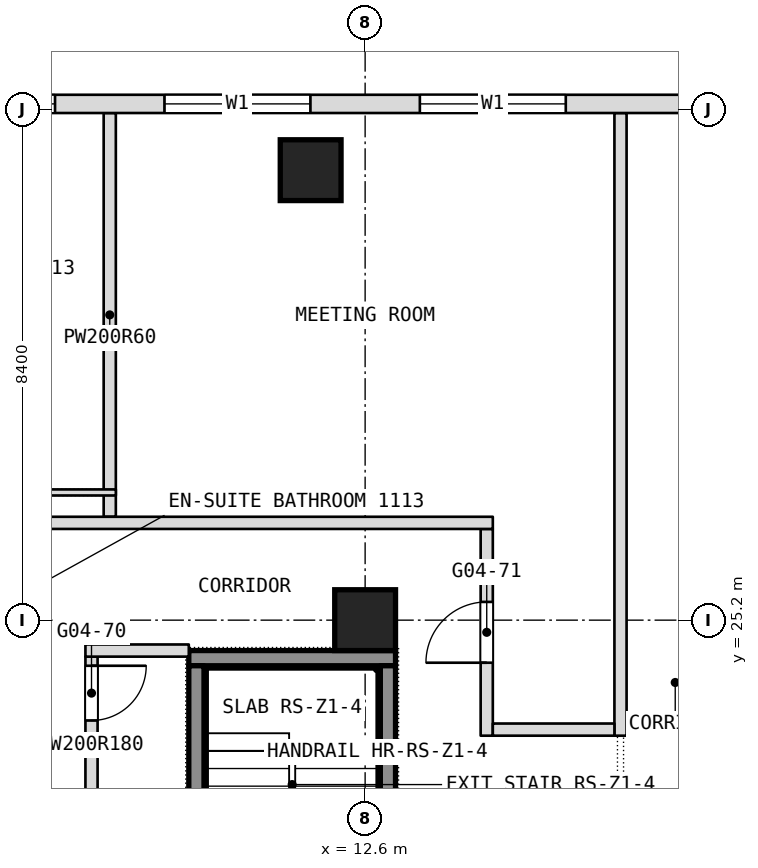
"""IFC4 building model, lengths in metres.
Left out: names, types, materials, properties, quantities, classifications, styles, units other than length and angle.
Written with IfcOpenShell. Run it as: python <this file> out.ifc"""

import sys

from ifc_helpers import new_model, si_unit, direction, frame, frame_2d, origin, origin_2d, place, context, subcontext, project, spatial, rectangle, extrude, element, fill, save


model = new_model("IFC4")
c1 = context("Model", 3, precision=1e-05, world=origin(), true_north=direction((0.0, 1.0)))
c2 = subcontext(c1, "Body", "Model", "MODEL_VIEW")
j1 = project(units=[si_unit("LENGTHUNIT", "METRE"), si_unit("PLANEANGLEUNIT", "RADIAN")], contexts=[c1])
p1 = place(None, origin())
s1 = spatial("IfcSite", under=j1, at=p1, CompositionType="ELEMENT")
p2 = place(p1, origin())
s2 = spatial("IfcBuilding", under=s1, at=p2, CompositionType="ELEMENT")
p3 = place(p2, frame((0.0, 0.0, 54.5)))
s3 = spatial("IfcBuildingStorey", under=s2, at=p3, CompositionType="ELEMENT", Elevation=54.5)
for number, where, z_axis, x_axis in (
    (1, (12.6, 25.2, 0.0), (0.0, 0.0, 1.0), (1.0, 0.0, 0.0)),
    (2, (11.704, 32.6, 0.0), (0.0, 0.0, 1.0), (1.0, 0.0, 0.0)),
):
    element("IfcColumn", number, at=place(p3, frame(where, z_axis=z_axis, x_axis=x_axis)), inside=s3, PredefinedType="COLUMN", context=c2, shape_type="SweptSolid", body=[
        extrude(rectangle(XDim=1.0, YDim=1.0, at=origin_2d()), origin(), (0.0, 0.0, 1.0), 3.6),
    ])
p4 = place(p3, frame((16.8, 23.3, 0.0), z_axis=(0.0, 0.0, 1.0), x_axis=(0.0, 1.0, 0.0)))
e3 = element("IfcWall", 3, at=p4, inside=s3, PredefinedType="PARTITIONING", context=c2, shape_type="SweptSolid", body=[
    extrude(rectangle(XDim=10.24, YDim=0.2, at=frame_2d((5.12, 0.0))), origin(), (0.0, 0.0, 1.0), 3.34),
])
p5 = place(p3, frame((14.6, 23.3, 0.0), z_axis=(0.0, 0.0, 1.0), x_axis=(0.0, 1.0, 0.0)))
e4 = element("IfcWall", 4, at=p5, inside=s3, PredefinedType="PARTITIONING", context=c2, shape_type="SweptSolid", body=[
    extrude(rectangle(XDim=3.4, YDim=0.2, at=frame_2d((1.7, 0.0))), origin(), (0.0, 0.0, 1.0), 3.34),
])
p6 = place(p5, frame((1.2, 0.0, 0.0)))
e5 = element("IfcOpeningElement", 5, at=p6, cuts=e4, PredefinedType="OPENING", context=c2, shape_type="SweptSolid", body=[
    extrude(rectangle(XDim=1.0, YDim=2.1, at=frame_2d((0.5, 1.05))), frame((0.0, 0.1, 0.0), z_axis=(0.0, -1.0, 0.0), x_axis=(1.0, 0.0, 0.0)), (0.0, 0.0, 1.0), 0.2),
])
p7 = place(p3, frame((8.4, 26.9, 0.0), z_axis=(0.0, 0.0, 1.0), x_axis=(0.0, 1.0, 0.0)))
e6 = element("IfcWall", 6, at=p7, inside=s3, PredefinedType="PARTITIONING", context=c2, shape_type="SweptSolid", body=[
    extrude(rectangle(XDim=6.64, YDim=0.2, at=frame_2d((3.32, 0.0))), origin(), (0.0, 0.0, 1.0), 3.34),
])
p8 = place(p3, frame((8.1, 21.7, 0.0), z_axis=(0.0, 0.0, 1.0), x_axis=(0.0, 1.0, 0.0)))
e7 = element("IfcWall", 7, at=p8, inside=s3, PredefinedType="PARTITIONING", context=c2, shape_type="SweptSolid", body=[
    extrude(rectangle(XDim=2.9, YDim=0.2, at=frame_2d((1.45, 0.0))), origin(), (0.0, 0.0, 1.0), 3.34),
])
p9 = place(p8, frame((1.85, 0.0, 0.0)))
e8 = element("IfcOpeningElement", 8, at=p9, cuts=e7, PredefinedType="OPENING", context=c2, shape_type="SweptSolid", body=[
    extrude(rectangle(XDim=0.9, YDim=2.1, at=frame_2d((0.45, 1.05))), frame((0.0, 0.1, 0.0), z_axis=(0.0, -1.0, 0.0), x_axis=(1.0, 0.0, 0.0)), (0.0, 0.0, 1.0), 0.2),
])
p10 = place(p3, frame((14.7, 23.4, 0.0), z_axis=(0.0, 0.0, 1.0), x_axis=(1.0, 0.0, 0.0)))
e9 = element("IfcWall", 9, at=p10, inside=s3, PredefinedType="PARTITIONING", context=c2, shape_type="SweptSolid", body=[
    extrude(rectangle(XDim=2.0, YDim=0.2, at=frame_2d((1.0, 0.0))), origin(), (0.0, 0.0, 1.0), 3.34),
])
p11 = place(p3, frame((8.0, 24.7, 0.0), z_axis=(0.0, 0.0, 1.0), x_axis=(1.0, 0.0, 0.0)))
e10 = element("IfcWall", 10, at=p11, inside=s3, PredefinedType="PARTITIONING", context=c2, shape_type="SweptSolid", body=[
    extrude(rectangle(XDim=1.7, YDim=0.2, at=frame_2d((0.85, 0.0))), origin(), (0.0, 0.0, 1.0), 3.34),
])
p12 = place(p3, frame((6.7, 26.8, 0.0), z_axis=(0.0, 0.0, 1.0), x_axis=(1.0, 0.0, 0.0)))
e11 = element("IfcWall", 11, at=p12, inside=s3, PredefinedType="PARTITIONING", context=c2, shape_type="SweptSolid", body=[
    extrude(rectangle(XDim=8.0, YDim=0.2, at=frame_2d((4.0, 0.0))), origin(), (0.0, 0.0, 1.0), 3.34),
])
p13 = place(p3, frame((5.95, 27.3, 0.0), z_axis=(0.0, 0.0, 1.0), x_axis=(1.0, 0.0, 0.0)))
e12 = element("IfcWall", 12, at=p13, inside=s3, PredefinedType="PARTITIONING", context=c2, shape_type="SweptSolid", body=[
    extrude(rectangle(XDim=2.55, YDim=0.1, at=frame_2d((1.275, 0.0))), origin(), (0.0, 0.0, 1.0), 3.34),
])
p14 = place(p13, frame((0.15, 0.0, 0.0)))
e13 = element("IfcOpeningElement", 13, at=p14, cuts=e12, PredefinedType="OPENING", context=c2, shape_type="SweptSolid", body=[
    extrude(rectangle(XDim=0.9, YDim=2.1, at=frame_2d((0.45, 1.05))), frame((0.0, 0.05, 0.0), z_axis=(0.0, -1.0, 0.0), x_axis=(1.0, 0.0, 0.0)), (0.0, 0.0, 1.0), 0.1),
])
p15 = place(p3, frame((23.406, 33.69, 0.0), z_axis=(0.0, 0.0, 1.0), x_axis=(-1.0, 0.0, 0.0)))
e14 = element("IfcWall", 14, at=p15, inside=s3, PredefinedType="NOTDEFINED", context=c2, shape_type="SweptSolid", body=[
    extrude(rectangle(XDim=46.812, YDim=0.3, at=frame_2d((23.406, 0.0))), origin(), (0.0, 0.0, 1.0), 3.6),
])
p16 = place(p15, frame((2.186, 0.0, 0.9)))
e15 = element("IfcOpeningElement", 15, at=p16, cuts=e14, PredefinedType="OPENING", context=c2, shape_type="SweptSolid", body=[
    extrude(rectangle(XDim=2.4, YDim=2.1, at=frame_2d((1.2, 1.05))), frame((0.0, 0.15, 0.0), z_axis=(0.0, -1.0, 0.0), x_axis=(1.0, 0.0, 0.0)), (0.0, 0.0, 1.0), 0.3),
])
p17 = place(p15, frame((7.506, 0.0, 0.9)))
e16 = element("IfcOpeningElement", 16, at=p17, cuts=e14, PredefinedType="OPENING", context=c2, shape_type="SweptSolid", body=[
    extrude(rectangle(XDim=2.4, YDim=2.1, at=frame_2d((1.2, 1.05))), frame((0.0, 0.15, 0.0), z_axis=(0.0, -1.0, 0.0), x_axis=(1.0, 0.0, 0.0)), (0.0, 0.0, 1.0), 0.3),
])
p18 = place(p15, frame((11.706, 0.0, 0.9)))
e17 = element("IfcOpeningElement", 17, at=p18, cuts=e14, PredefinedType="OPENING", context=c2, shape_type="SweptSolid", body=[
    extrude(rectangle(XDim=2.4, YDim=2.1, at=frame_2d((1.2, 1.05))), frame((0.0, 0.15, 0.0), z_axis=(0.0, -1.0, 0.0), x_axis=(1.0, 0.0, 0.0)), (0.0, 0.0, 1.0), 0.3),
])
p19 = place(p15, frame((15.906, 0.0, 0.9)))
e18 = element("IfcOpeningElement", 18, at=p19, cuts=e14, PredefinedType="OPENING", context=c2, shape_type="SweptSolid", body=[
    extrude(rectangle(XDim=2.4, YDim=2.1, at=frame_2d((1.2, 1.05))), frame((0.0, 0.15, 0.0), z_axis=(0.0, -1.0, 0.0), x_axis=(1.0, 0.0, 0.0)), (0.0, 0.0, 1.0), 0.3),
])
p20 = place(p15, frame((20.106, 0.0, 0.9)))
e19 = element("IfcOpeningElement", 19, at=p20, cuts=e14, PredefinedType="OPENING", context=c2, shape_type="SweptSolid", body=[
    extrude(rectangle(XDim=2.4, YDim=2.1, at=frame_2d((1.2, 1.05))), frame((0.0, 0.15, 0.0), z_axis=(0.0, -1.0, 0.0), x_axis=(1.0, 0.0, 0.0)), (0.0, 0.0, 1.0), 0.3),
])
p21 = place(p15, frame((24.306, 0.0, 0.9)))
e20 = element("IfcOpeningElement", 20, at=p21, cuts=e14, PredefinedType="OPENING", context=c2, shape_type="SweptSolid", body=[
    extrude(rectangle(XDim=2.4, YDim=2.1, at=frame_2d((1.2, 1.05))), frame((0.0, 0.15, 0.0), z_axis=(0.0, -1.0, 0.0), x_axis=(1.0, 0.0, 0.0)), (0.0, 0.0, 1.0), 0.3),
])
p22 = place(p15, frame((28.506, 0.0, 0.9)))
e21 = element("IfcOpeningElement", 21, at=p22, cuts=e14, PredefinedType="OPENING", context=c2, shape_type="SweptSolid", body=[
    extrude(rectangle(XDim=2.4, YDim=2.1, at=frame_2d((1.2, 1.05))), frame((0.0, 0.15, 0.0), z_axis=(0.0, -1.0, 0.0), x_axis=(1.0, 0.0, 0.0)), (0.0, 0.0, 1.0), 0.3),
])
p23 = place(p15, frame((32.706, 0.0, 0.9)))
e22 = element("IfcOpeningElement", 22, at=p23, cuts=e14, PredefinedType="OPENING", context=c2, shape_type="SweptSolid", body=[
    extrude(rectangle(XDim=2.4, YDim=2.1, at=frame_2d((1.2, 1.05))), frame((0.0, 0.15, 0.0), z_axis=(0.0, -1.0, 0.0), x_axis=(1.0, 0.0, 0.0)), (0.0, 0.0, 1.0), 0.3),
])
p24 = place(p15, frame((36.906, 0.0, 0.9)))
e23 = element("IfcOpeningElement", 23, at=p24, cuts=e14, PredefinedType="OPENING", context=c2, shape_type="SweptSolid", body=[
    extrude(rectangle(XDim=2.4, YDim=2.1, at=frame_2d((1.2, 1.05))), frame((0.0, 0.15, 0.0), z_axis=(0.0, -1.0, 0.0), x_axis=(1.0, 0.0, 0.0)), (0.0, 0.0, 1.0), 0.3),
])
p25 = place(p15, frame((42.226, 0.0, 0.9)))
e24 = element("IfcOpeningElement", 24, at=p25, cuts=e14, PredefinedType="OPENING", context=c2, shape_type="SweptSolid", body=[
    extrude(rectangle(XDim=2.4, YDim=2.1, at=frame_2d((1.2, 1.05))), frame((0.0, 0.15, 0.0), z_axis=(0.0, -1.0, 0.0), x_axis=(1.0, 0.0, 0.0)), (0.0, 0.0, 1.0), 0.3),
])
p26 = place(p3, frame((9.7, 24.575, 0.1), z_axis=(0.0, 0.0, 1.0), x_axis=(1.0, 0.0, 0.0)))
e25 = element("IfcWall", 25, at=p26, inside=s3, PredefinedType="SHEAR", context=c2, shape_type="SweptSolid", body=[
    extrude(rectangle(XDim=3.4, YDim=0.25, at=frame_2d((1.7, 0.0))), origin(), (0.0, 0.0, 1.0), 3.6),
])
p27 = place(p3, frame((9.825, 18.75, 0.1), z_axis=(0.0, 0.0, 1.0), x_axis=(0.0, 1.0, 0.0)))
e26 = element("IfcWall", 26, at=p27, inside=s3, PredefinedType="SHEAR", context=c2, shape_type="SweptSolid", body=[
    extrude(rectangle(XDim=5.7, YDim=0.25, at=frame_2d((2.85, 0.0))), origin(), (0.0, 0.0, 1.0), 3.6),
])
p28 = place(p27, frame((0.2, 0.0, 0.0)))
e27 = element("IfcOpeningElement", 27, at=p28, cuts=e26, PredefinedType="OPENING", context=c2, shape_type="SweptSolid", body=[
    extrude(rectangle(XDim=1.0, YDim=2.1, at=frame_2d((0.5, 1.05))), frame((0.0, 0.125, 0.0), z_axis=(0.0, -1.0, 0.0), x_axis=(1.0, 0.0, 0.0)), (0.0, 0.0, 1.0), 0.25),
])
p29 = place(p3, frame((12.975, 18.75, 0.1), z_axis=(0.0, 0.0, 1.0), x_axis=(0.0, 1.0, 0.0)))
e28 = element("IfcWall", 28, at=p29, inside=s3, PredefinedType="SHEAR", context=c2, shape_type="SweptSolid", body=[
    extrude(rectangle(XDim=5.7, YDim=0.25, at=frame_2d((2.85, 0.0))), origin(), (0.0, 0.0, 1.0), 3.6),
])
p30 = place(p6, origin())
e29 = element("IfcDoor", 29, at=p30, inside=s3, OperationType="SINGLE_SWING_LEFT", PredefinedType="DOOR", context=c2, shape_type="SweptSolid", body=[
    extrude(rectangle(XDim=1.0, YDim=2.1, at=frame_2d((0.5, 1.05))), frame((0.0, 0.025, 0.0), z_axis=(0.0, -1.0, 0.0), x_axis=(1.0, 0.0, 0.0)), (0.0, 0.0, 1.0), 0.05),
])
fill(e5, e29)
p31 = place(p9, origin())
e30 = element("IfcDoor", 30, at=p31, inside=s3, OperationType="SINGLE_SWING_LEFT", PredefinedType="DOOR", context=c2, shape_type="SweptSolid", body=[
    extrude(rectangle(XDim=0.9, YDim=2.1, at=frame_2d((0.45, 1.05))), frame((0.0, 0.025, 0.0), z_axis=(0.0, -1.0, 0.0), x_axis=(1.0, 0.0, 0.0)), (0.0, 0.0, 1.0), 0.05),
])
fill(e8, e30)
p32 = place(p17, origin())
e31 = element("IfcWindow", 31, at=p32, inside=s3, PartitioningType="SINGLE_PANEL", PredefinedType="WINDOW", context=c2, shape_type="SweptSolid", body=[
    extrude(rectangle(XDim=2.4, YDim=2.1, at=frame_2d((1.2, 1.05))), frame((0.0, 0.03, 0.0), z_axis=(0.0, -1.0, 0.0), x_axis=(1.0, 0.0, 0.0)), (0.0, 0.0, 1.0), 0.06),
])
fill(e16, e31)
p33 = place(p18, origin())
e32 = element("IfcWindow", 32, at=p33, inside=s3, PartitioningType="SINGLE_PANEL", PredefinedType="WINDOW", context=c2, shape_type="SweptSolid", body=[
    extrude(rectangle(XDim=2.4, YDim=2.1, at=frame_2d((1.2, 1.05))), frame((0.0, 0.03, 0.0), z_axis=(0.0, -1.0, 0.0), x_axis=(1.0, 0.0, 0.0)), (0.0, 0.0, 1.0), 0.06),
])
fill(e17, e32)
p34 = place(p19, origin())
e33 = element("IfcWindow", 33, at=p34, inside=s3, PartitioningType="SINGLE_PANEL", PredefinedType="WINDOW", context=c2, shape_type="SweptSolid", body=[
    extrude(rectangle(XDim=2.4, YDim=2.1, at=frame_2d((1.2, 1.05))), frame((0.0, 0.03, 0.0), z_axis=(0.0, -1.0, 0.0), x_axis=(1.0, 0.0, 0.0)), (0.0, 0.0, 1.0), 0.06),
])
fill(e18, e33)
save(model, sys.argv[1])
